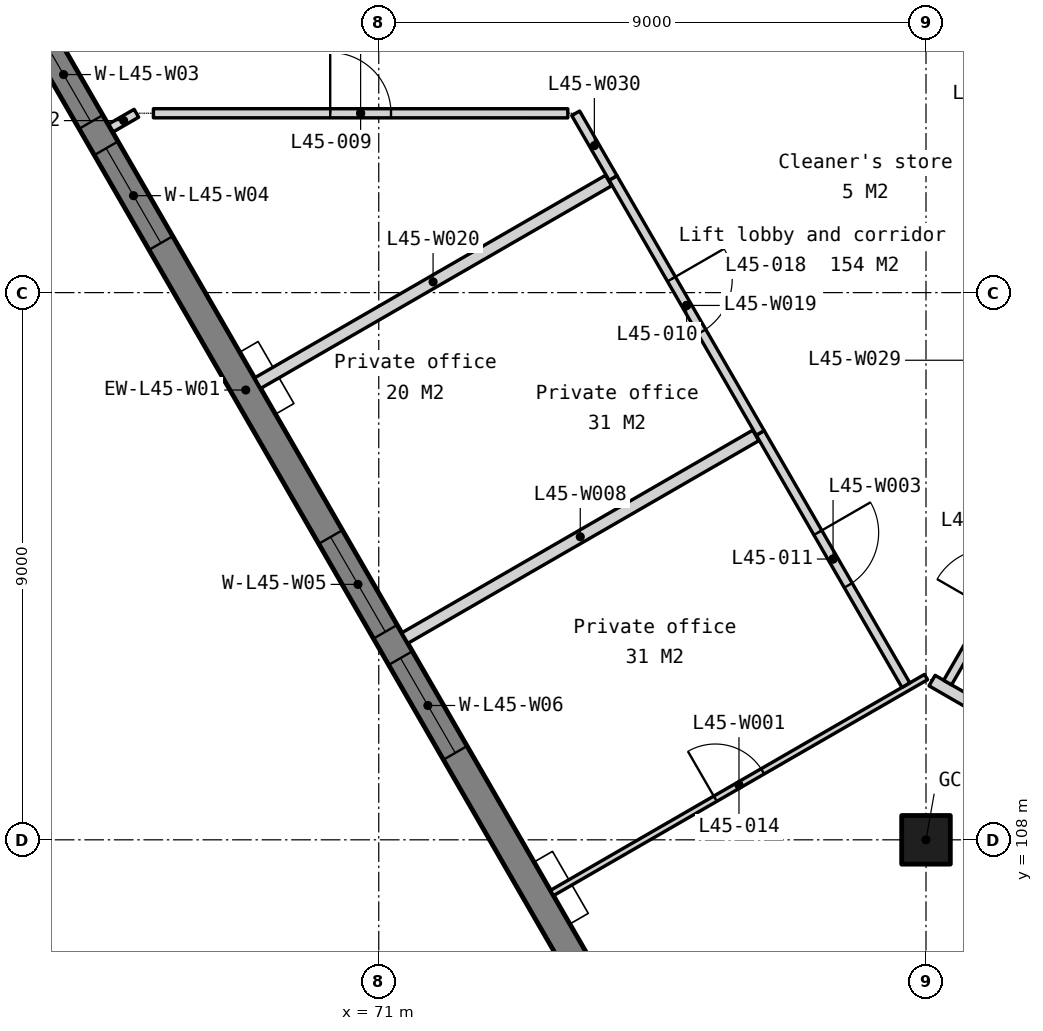
"""IFC4 building model, lengths in metres.
Left out: names, types, materials, properties, quantities, classifications, styles, units other than length and angle.
Written with IfcOpenShell. Run it as: python <this file> out.ifc"""

import sys

from ifc_helpers import new_model, si_unit, direction, frame, frame_2d, origin, origin_2d, place, context, subcontext, project, spatial, polyline, rectangle, outline, extrude, element, fill, save


model = new_model("IFC4")
c1 = context("Model", 3, precision=1e-05, world=origin(), true_north=direction((0.0, 1.0)))
c2 = subcontext(c1, "Body", "Model", "MODEL_VIEW")
j1 = project(units=[si_unit("LENGTHUNIT", "METRE"), si_unit("PLANEANGLEUNIT", "RADIAN")], contexts=[c1])
p1 = place(None, origin())
s1 = spatial("IfcSite", under=j1, at=p1, CompositionType="ELEMENT")
p2 = place(p1, origin())
s2 = spatial("IfcBuilding", under=s1, at=p2, CompositionType="ELEMENT")
p3 = place(p2, frame((0.0, 0.0, 180.2)))
s3 = spatial("IfcBuildingStorey", under=s2, at=p3, CompositionType="ELEMENT", Elevation=180.2)
p4 = place(p3, frame((80.0, 108.0, 0.0), z_axis=(0.0, 0.0, 1.0), x_axis=(1.0, 0.0, 0.0)))
e1 = element("IfcColumn", 1, at=p4, inside=s3, PredefinedType="COLUMN", context=c2, shape_type="SweptSolid", body=[
    extrude(rectangle(XDim=0.8, YDim=0.8, at=origin_2d()), origin(), (0.0, 0.0, 1.0), 3.9),
])
p5 = place(p3, frame((59.13, 132.168, -0.45), z_axis=(0.0, 0.0, 1.0), x_axis=(0.500002199942, -0.866024133644, 0.0)))
e2 = element("IfcWall", 2, at=p5, inside=s3, PredefinedType="SOLIDWALL", context=c2, shape_type="SweptSolid", body=[
    extrude(outline(polyline([(38.729, 0.0), (38.729, 4.2), (0.0, 4.2), (0.0, 0.0), (38.729, 0.0)])), frame((0.0, 0.225, 0.0), z_axis=(0.0, -1.0, 0.0), x_axis=(1.0, 0.0, 0.0)), (0.0, 0.0, 1.0), 0.45),
])
p6 = place(p5, frame((2.791, 0.0, 1.25)))
e3 = element("IfcOpeningElement", 3, at=p6, cuts=e2, PredefinedType="OPENING", context=c2, shape_type="SweptSolid", body=[
    extrude(rectangle(XDim=1.8, YDim=2.2, at=frame_2d((0.9, 1.1))), frame((0.0, 0.235, 0.0), z_axis=(0.0, -1.0, 0.0), x_axis=(1.0, 0.0, 0.0)), (0.0, 0.0, 1.0), 0.47),
])
p7 = place(p5, frame((5.091, 0.0, 1.25)))
e4 = element("IfcOpeningElement", 4, at=p7, cuts=e2, PredefinedType="OPENING", context=c2, shape_type="SweptSolid", body=[
    extrude(rectangle(XDim=1.8, YDim=2.2, at=frame_2d((0.9, 1.1))), frame((0.0, 0.235, 0.0), z_axis=(0.0, -1.0, 0.0), x_axis=(1.0, 0.0, 0.0)), (0.0, 0.0, 1.0), 0.47),
])
p8 = place(p5, frame((12.473, 0.0, 1.25)))
e5 = element("IfcOpeningElement", 5, at=p8, cuts=e2, PredefinedType="OPENING", context=c2, shape_type="SweptSolid", body=[
    extrude(rectangle(XDim=1.8, YDim=2.2, at=frame_2d((0.9, 1.1))), frame((0.0, 0.235, 0.0), z_axis=(0.0, -1.0, 0.0), x_axis=(1.0, 0.0, 0.0)), (0.0, 0.0, 1.0), 0.47),
])
p9 = place(p5, frame((14.773, 0.0, 1.25)))
e6 = element("IfcOpeningElement", 6, at=p9, cuts=e2, PredefinedType="OPENING", context=c2, shape_type="SweptSolid", body=[
    extrude(rectangle(XDim=1.8, YDim=2.2, at=frame_2d((0.9, 1.1))), frame((0.0, 0.235, 0.0), z_axis=(0.0, -1.0, 0.0), x_axis=(1.0, 0.0, 0.0)), (0.0, 0.0, 1.0), 0.47),
])
p10 = place(p5, frame((22.156, 0.0, 1.25)))
e7 = element("IfcOpeningElement", 7, at=p10, cuts=e2, PredefinedType="OPENING", context=c2, shape_type="SweptSolid", body=[
    extrude(rectangle(XDim=1.8, YDim=2.2, at=frame_2d((0.9, 1.1))), frame((0.0, 0.235, 0.0), z_axis=(0.0, -1.0, 0.0), x_axis=(1.0, 0.0, 0.0)), (0.0, 0.0, 1.0), 0.47),
])
p11 = place(p5, frame((24.456, 0.0, 1.25)))
e8 = element("IfcOpeningElement", 8, at=p11, cuts=e2, PredefinedType="OPENING", context=c2, shape_type="SweptSolid", body=[
    extrude(rectangle(XDim=1.8, YDim=2.2, at=frame_2d((0.9, 1.1))), frame((0.0, 0.235, 0.0), z_axis=(0.0, -1.0, 0.0), x_axis=(1.0, 0.0, 0.0)), (0.0, 0.0, 1.0), 0.47),
])
p12 = place(p5, frame((31.838, 0.0, 1.25)))
e9 = element("IfcOpeningElement", 9, at=p12, cuts=e2, PredefinedType="OPENING", context=c2, shape_type="SweptSolid", body=[
    extrude(rectangle(XDim=1.8, YDim=2.2, at=frame_2d((0.9, 1.1))), frame((0.0, 0.235, 0.0), z_axis=(0.0, -1.0, 0.0), x_axis=(1.0, 0.0, 0.0)), (0.0, 0.0, 1.0), 0.47),
])
p13 = place(p5, frame((34.138, 0.0, 1.25)))
e10 = element("IfcOpeningElement", 10, at=p13, cuts=e2, PredefinedType="OPENING", context=c2, shape_type="SweptSolid", body=[
    extrude(rectangle(XDim=1.8, YDim=2.2, at=frame_2d((0.9, 1.1))), frame((0.0, 0.235, 0.0), z_axis=(0.0, -1.0, 0.0), x_axis=(1.0, 0.0, 0.0)), (0.0, 0.0, 1.0), 0.47),
])
p14 = place(p3, frame((73.849, 107.125, 0.0), z_axis=(0.0, 0.0, 1.0), x_axis=(0.866024174161, 0.500002129764, 0.0)))
e11 = element("IfcWall", 11, at=p14, inside=s3, PredefinedType="PARTITIONING", context=c2, shape_type="SweptSolid", body=[
    extrude(rectangle(XDim=7.103, YDim=0.1, at=frame_2d((3.552, 0.0))), origin(), (0.0, 0.0, 1.0), 3.75),
])
p15 = place(p14, frame((3.102, 0.0, 0.0)))
e12 = element("IfcOpeningElement", 12, at=p15, cuts=e11, PredefinedType="OPENING", context=c2, shape_type="SweptSolid", body=[
    extrude(rectangle(XDim=0.9, YDim=2.1, at=frame_2d((0.45, 1.05))), frame((0.0, 0.06, 0.0), z_axis=(0.0, -1.0, 0.0), x_axis=(1.0, 0.0, 0.0)), (0.0, 0.0, 1.0), 0.12),
])
p16 = place(p3, frame((77.274, 114.693, 0.0), z_axis=(0.0, 0.0, 1.0), x_axis=(0.499997407846, -0.86602690036, 0.0)))
e13 = element("IfcWall", 13, at=p16, inside=s3, PredefinedType="PARTITIONING", context=c2, shape_type="SweptSolid", body=[
    extrude(rectangle(XDim=4.791, YDim=0.15, at=frame_2d((2.396, 0.0))), origin(), (0.0, 0.0, 1.0), 3.75),
])
p17 = place(p16, frame((1.896, 0.0, 0.0)))
e14 = element("IfcOpeningElement", 14, at=p17, cuts=e13, PredefinedType="OPENING", context=c2, shape_type="SweptSolid", body=[
    extrude(rectangle(XDim=1.0, YDim=2.1, at=frame_2d((0.5, 1.05))), frame((0.0, 0.085, 0.0), z_axis=(0.0, -1.0, 0.0), x_axis=(1.0, 0.0, 0.0)), (0.0, 0.0, 1.0), 0.17),
])
p18 = place(p3, frame((80.1, 110.619, 0.0), z_axis=(0.0, 0.0, 1.0), x_axis=(0.866028486751, -0.499994660107, 0.0)))
e15 = element("IfcWall", 15, at=p18, inside=s3, PredefinedType="PARTITIONING", context=c2, shape_type="SweptSolid", body=[
    extrude(rectangle(XDim=6.987, YDim=0.2, at=frame_2d((3.494, 0.0))), origin(), (0.0, 0.0, 1.0), 3.75),
])
p19 = place(p3, frame((71.428, 111.318, 0.0), z_axis=(0.0, 0.0, 1.0), x_axis=(0.866020884234, 0.500007828009, 0.0)))
e16 = element("IfcWall", 16, at=p19, inside=s3, PredefinedType="PARTITIONING", context=c2, shape_type="SweptSolid", body=[
    extrude(rectangle(XDim=6.665, YDim=0.2, at=frame_2d((3.333, 0.0))), origin(), (0.0, 0.0, 1.0), 3.75),
])
p20 = place(p3, frame((80.356, 110.587, 0.0), z_axis=(0.0, 0.0, 1.0), x_axis=(0.500008086624, 0.86602073492, 0.0)))
e17 = element("IfcWall", 17, at=p20, inside=s3, PredefinedType="PARTITIONING", context=c2, shape_type="SweptSolid", body=[
    extrude(rectangle(XDim=3.773, YDim=0.15, at=frame_2d((1.887, 0.0))), origin(), (0.0, 0.0, 1.0), 3.75),
])
p21 = place(p20, frame((1.387, 0.0, 0.0)))
e18 = element("IfcOpeningElement", 18, at=p21, cuts=e17, PredefinedType="OPENING", context=c2, shape_type="SweptSolid", body=[
    extrude(rectangle(XDim=1.0, YDim=2.1, at=frame_2d((0.5, 1.05))), frame((0.0, 0.085, 0.0), z_axis=(0.0, -1.0, 0.0), x_axis=(1.0, 0.0, 0.0)), (0.0, 0.0, 1.0), 0.17),
])
p22 = place(p3, frame((74.853, 118.885, 0.0), z_axis=(0.0, 0.0, 1.0), x_axis=(0.500006196252, -0.866021826347, 0.0)))
e19 = element("IfcWall", 19, at=p22, inside=s3, PredefinedType="PARTITIONING", context=c2, shape_type="SweptSolid", body=[
    extrude(rectangle(XDim=4.841, YDim=0.15, at=frame_2d((2.421, 0.0))), origin(), (0.0, 0.0, 1.0), 3.75),
])
p23 = place(p22, frame((1.921, 0.0, 0.0)))
e20 = element("IfcOpeningElement", 20, at=p23, cuts=e19, PredefinedType="OPENING", context=c2, shape_type="SweptSolid", body=[
    extrude(rectangle(XDim=1.0, YDim=2.1, at=frame_2d((0.5, 1.05))), frame((0.0, 0.085, 0.0), z_axis=(0.0, -1.0, 0.0), x_axis=(1.0, 0.0, 0.0)), (0.0, 0.0, 1.0), 0.17),
])
p24 = place(p3, frame((69.007, 115.51, 0.0), z_axis=(0.0, 0.0, 1.0), x_axis=(0.866030041738, 0.499991966744, 0.0)))
e21 = element("IfcWall", 21, at=p24, inside=s3, PredefinedType="PARTITIONING", context=c2, shape_type="SweptSolid", body=[
    extrude(rectangle(XDim=6.665, YDim=0.2, at=frame_2d((3.333, 0.0))), origin(), (0.0, 0.0, 1.0), 3.75),
])
p25 = place(p3, frame((74.239, 119.949, 0.0), z_axis=(0.0, 0.0, 1.0), x_axis=(0.499923202248, -0.866069738447, 0.0)))
e22 = element("IfcWall", 22, at=p25, inside=s3, PredefinedType="PARTITIONING", context=c2, shape_type="SweptSolid", body=[
    extrude(rectangle(XDim=1.228, YDim=0.15, at=frame_2d((0.614, 0.0))), origin(), (0.0, 0.0, 1.0), 3.75),
])
p26 = place(p3, frame((66.595, 119.708, 0.0), z_axis=(0.0, 0.0, 1.0), x_axis=(0.865967067452, 0.500101027882, 0.0)))
e23 = element("IfcWall", 23, at=p26, inside=s3, PredefinedType="PARTITIONING", context=c2, shape_type="SweptSolid", body=[
    extrude(rectangle(XDim=0.484, YDim=0.15, at=frame_2d((0.242, 0.0))), origin(), (0.0, 0.0, 1.0), 3.75),
])
p27 = place(p3, frame((67.294, 119.95, 0.0), z_axis=(0.0, 0.0, 1.0), x_axis=(0.999999994225, -0.000107472952, 0.0)))
e24 = element("IfcWall", 24, at=p27, inside=s3, PredefinedType="PARTITIONING", context=c2, shape_type="SweptSolid", body=[
    extrude(rectangle(XDim=6.815, YDim=0.15, at=frame_2d((3.407, 0.0))), origin(), (0.0, 0.0, 1.0), 3.75),
])
p28 = place(p27, frame((2.907, 0.0, 0.0)))
e25 = element("IfcOpeningElement", 25, at=p28, cuts=e24, PredefinedType="OPENING", context=c2, shape_type="SweptSolid", body=[
    extrude(rectangle(XDim=1.0, YDim=2.1, at=frame_2d((0.5, 1.05))), frame((0.0, 0.085, 0.0), z_axis=(0.0, -1.0, 0.0), x_axis=(1.0, 0.0, 0.0)), (0.0, 0.0, 1.0), 0.17),
])
p29 = place(p8, origin())
e26 = element("IfcWindow", 26, at=p29, inside=s3, PartitioningType="SINGLE_PANEL", PredefinedType="WINDOW", context=c2, shape_type="SweptSolid", body=[
    extrude(rectangle(XDim=1.8, YDim=2.2, at=frame_2d((0.9, 1.1))), frame((0.0, 0.03, 0.0), z_axis=(0.0, -1.0, 0.0), x_axis=(1.0, 0.0, 0.0)), (0.0, 0.0, 1.0), 0.06),
])
fill(e5, e26)
p30 = place(p9, origin())
e27 = element("IfcWindow", 27, at=p30, inside=s3, PartitioningType="SINGLE_PANEL", PredefinedType="WINDOW", context=c2, shape_type="SweptSolid", body=[
    extrude(rectangle(XDim=1.8, YDim=2.2, at=frame_2d((0.9, 1.1))), frame((0.0, 0.03, 0.0), z_axis=(0.0, -1.0, 0.0), x_axis=(1.0, 0.0, 0.0)), (0.0, 0.0, 1.0), 0.06),
])
fill(e6, e27)
p31 = place(p10, origin())
e28 = element("IfcWindow", 28, at=p31, inside=s3, PartitioningType="SINGLE_PANEL", PredefinedType="WINDOW", context=c2, shape_type="SweptSolid", body=[
    extrude(rectangle(XDim=1.8, YDim=2.2, at=frame_2d((0.9, 1.1))), frame((0.0, 0.03, 0.0), z_axis=(0.0, -1.0, 0.0), x_axis=(1.0, 0.0, 0.0)), (0.0, 0.0, 1.0), 0.06),
])
fill(e7, e28)
p32 = place(p11, origin())
e29 = element("IfcWindow", 29, at=p32, inside=s3, PartitioningType="SINGLE_PANEL", PredefinedType="WINDOW", context=c2, shape_type="SweptSolid", body=[
    extrude(rectangle(XDim=1.8, YDim=2.2, at=frame_2d((0.9, 1.1))), frame((0.0, 0.03, 0.0), z_axis=(0.0, -1.0, 0.0), x_axis=(1.0, 0.0, 0.0)), (0.0, 0.0, 1.0), 0.06),
])
fill(e8, e29)
p33 = place(p28, origin())
e30 = element("IfcDoor", 30, at=p33, inside=s3, OperationType="SINGLE_SWING_LEFT", PredefinedType="DOOR", context=c2, shape_type="SweptSolid", body=[
    extrude(rectangle(XDim=1.0, YDim=2.1, at=frame_2d((0.5, 1.05))), frame((0.0, 0.025, 0.0), z_axis=(0.0, -1.0, 0.0), x_axis=(1.0, 0.0, 0.0)), (0.0, 0.0, 1.0), 0.05),
])
fill(e25, e30)
p34 = place(p23, origin())
e31 = element("IfcDoor", 31, at=p34, inside=s3, OperationType="SINGLE_SWING_LEFT", PredefinedType="DOOR", context=c2, shape_type="SweptSolid", body=[
    extrude(rectangle(XDim=1.0, YDim=2.1, at=frame_2d((0.5, 1.05))), frame((0.0, 0.025, 0.0), z_axis=(0.0, -1.0, 0.0), x_axis=(1.0, 0.0, 0.0)), (0.0, 0.0, 1.0), 0.05),
])
fill(e20, e31)
p35 = place(p17, origin())
e32 = element("IfcDoor", 32, at=p35, inside=s3, OperationType="SINGLE_SWING_LEFT", PredefinedType="DOOR", context=c2, shape_type="SweptSolid", body=[
    extrude(rectangle(XDim=1.0, YDim=2.1, at=frame_2d((0.5, 1.05))), frame((0.0, 0.025, 0.0), z_axis=(0.0, -1.0, 0.0), x_axis=(1.0, 0.0, 0.0)), (0.0, 0.0, 1.0), 0.05),
])
fill(e14, e32)
p36 = place(p15, origin())
e33 = element("IfcDoor", 33, at=p36, inside=s3, OperationType="SINGLE_SWING_LEFT", PredefinedType="DOOR", context=c2, shape_type="SweptSolid", body=[
    extrude(rectangle(XDim=0.9, YDim=2.1, at=frame_2d((0.45, 1.05))), frame((0.0, 0.025, 0.0), z_axis=(0.0, -1.0, 0.0), x_axis=(1.0, 0.0, 0.0)), (0.0, 0.0, 1.0), 0.05),
])
fill(e12, e33)
save(model, sys.argv[1])
